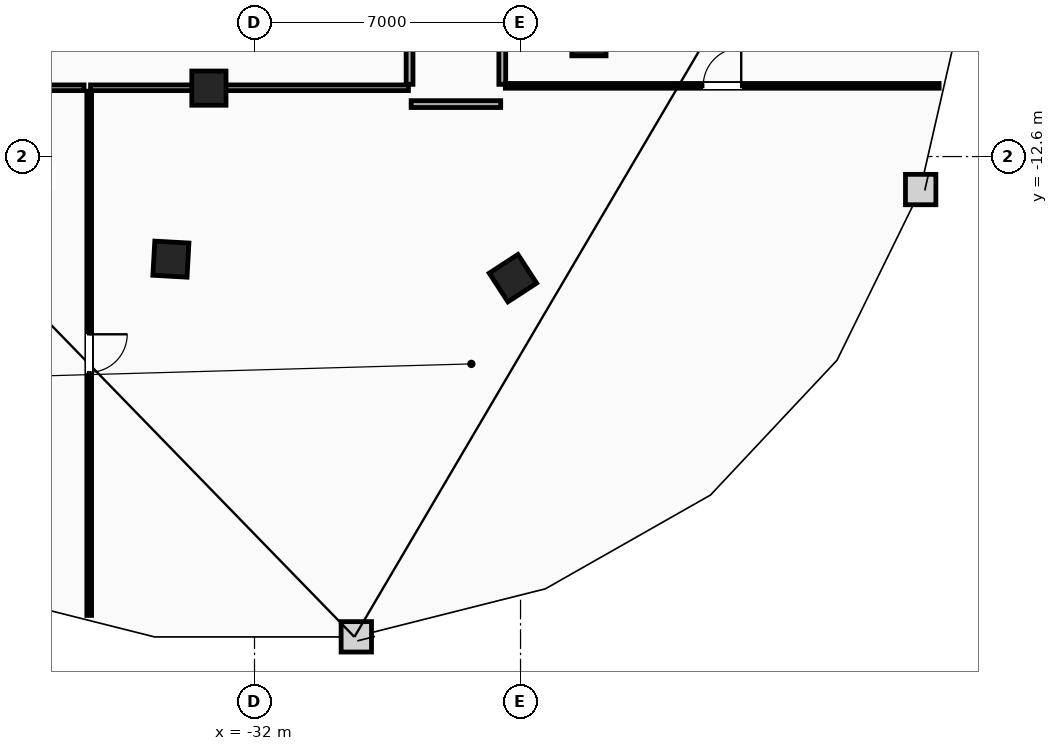
"""IFC4 building model, lengths in metres.
Left out: names, types, materials, properties, quantities, classifications, styles, units other than length and angle.
Written with IfcOpenShell. Run it as: python <this file> out.ifc"""

import sys

from ifc_helpers import new_model, si_unit, direction, frame, frame_2d, origin, origin_2d, place, context, subcontext, project, spatial, rectangle, extrude, element, fill, save


model = new_model("IFC4")
c1 = context("Model", 3, precision=1e-05, world=origin(), true_north=direction((0.0, 1.0)))
c2 = subcontext(c1, "Body", "Model", "MODEL_VIEW")
j1 = project(units=[si_unit("LENGTHUNIT", "METRE"), si_unit("PLANEANGLEUNIT", "RADIAN")], contexts=[c1])
p1 = place(None, origin())
s1 = spatial("IfcSite", under=j1, at=p1, CompositionType="ELEMENT")
p2 = place(p1, origin())
s2 = spatial("IfcBuilding", under=s1, at=p2, CompositionType="ELEMENT")
p3 = place(p2, frame((0.0, 0.0, 217.0)))
s3 = spatial("IfcBuildingStorey", under=s2, at=p3, CompositionType="ELEMENT", Elevation=217.0)
for number, where, z_axis, x_axis in (
    (1, (-33.2, -10.8, 0.0), (0.0, 0.0, 1.0), (1.0, 0.0, 0.0)),
    (2, (-23.2, -9.5, 0.0), (0.0, 0.0, 1.0), (1.0, 0.0, 0.0)),
    (3, (-34.2, -15.3, 0.0), (0.0, 0.0, 1.0), (0.998, -0.055, 0.0)),
    (4, (-25.2, -15.8, 0.0), (0.0, 0.0, 1.0), (0.838, 0.546, 0.0)),
):
    element("IfcColumn", number, at=place(p3, frame(where, z_axis=z_axis, x_axis=x_axis)), inside=s3, PredefinedType="COLUMN", context=c2, shape_type="SweptSolid", body=[
        extrude(rectangle(XDim=0.9, YDim=0.9, at=origin_2d()), origin(), (0.0, 0.0, 1.0), 3.6),
    ])
p4 = place(p3, frame((-50.082, -10.79, 0.0), z_axis=(0.0, 0.0, 1.0), x_axis=(1.0, 0.0, 0.0)))
e5 = element("IfcWall", 5, at=p4, inside=s3, PredefinedType="PARTITIONING", context=c2, shape_type="SweptSolid", body=[
    extrude(rectangle(XDim=13.597, YDim=0.15, at=frame_2d((6.799, 0.0))), origin(), (0.0, 0.0, 1.0), 3.34),
])
p5 = place(p3, frame((-36.315, -10.79, 0.0), z_axis=(0.0, 0.0, 1.0), x_axis=(1.0, 0.0, 0.0)))
e6 = element("IfcWall", 6, at=p5, inside=s3, PredefinedType="PARTITIONING", context=c2, shape_type="SweptSolid", body=[
    extrude(rectangle(XDim=8.365, YDim=0.15, at=frame_2d((4.183, 0.0))), origin(), (0.0, 0.0, 1.0), 2.724),
])
p6 = place(p3, frame((-27.878, -11.22, 0.0), z_axis=(0.0, 0.0, 1.0), x_axis=(1.0, 0.0, 0.0)))
e7 = element("IfcWall", 7, at=p6, inside=s3, PredefinedType="PARTITIONING", context=c2, shape_type="SweptSolid", body=[
    extrude(rectangle(XDim=2.357, YDim=0.18, at=frame_2d((1.178, 0.0))), origin(), (0.0, 0.0, 1.0), 3.34),
])
p7 = place(p3, frame((-27.92, -0.45, 0.0), z_axis=(0.0, 0.0, 1.0), x_axis=(0.0, -1.0, 0.0)))
e8 = element("IfcWall", 8, at=p7, inside=s3, PredefinedType="PARTITIONING", context=c2, shape_type="SweptSolid", body=[
    extrude(rectangle(XDim=10.25, YDim=0.18, at=frame_2d((5.125, 0.0))), origin(), (0.0, 0.0, 1.0), 3.34),
])
p8 = place(p7, frame((4.625, 0.0, 0.0)))
e9 = element("IfcOpeningElement", 9, at=p8, cuts=e8, PredefinedType="OPENING", context=c2, shape_type="SweptSolid", body=[
    extrude(rectangle(XDim=1.0, YDim=2.15, at=frame_2d((0.5, 1.075))), frame((0.0, 0.1, 0.0), z_axis=(0.0, -1.0, 0.0), x_axis=(1.0, 0.0, 0.0)), (0.0, 0.0, 1.0), 0.2),
])
p9 = place(p3, frame((-25.48, -10.7, 0.0), z_axis=(0.0, 0.0, 1.0), x_axis=(0.0, 1.0, 0.0)))
e10 = element("IfcWall", 10, at=p9, inside=s3, PredefinedType="PARTITIONING", context=c2, shape_type="SweptSolid", body=[
    extrude(rectangle(XDim=10.25, YDim=0.18, at=frame_2d((5.125, 0.0))), origin(), (0.0, 0.0, 1.0), 3.34),
])
p10 = place(p3, frame((-25.4, -10.74, 0.0), z_axis=(0.0, 0.0, 1.0), x_axis=(1.0, 0.0, 0.0)))
e11 = element("IfcWall", 11, at=p10, inside=s3, PredefinedType="PARTITIONING", context=c2, shape_type="SweptSolid", body=[
    extrude(rectangle(XDim=11.415, YDim=0.125, at=frame_2d((5.708, 0.0))), origin(), (0.0, 0.0, 1.0), 3.34),
])
p11 = place(p10, frame((5.208, 0.0, 0.0)))
e12 = element("IfcOpeningElement", 12, at=p11, cuts=e11, PredefinedType="OPENING", context=c2, shape_type="SweptSolid", body=[
    extrude(rectangle(XDim=1.0, YDim=2.15, at=frame_2d((0.5, 1.075))), frame((0.0, 0.073, 0.0), z_axis=(0.0, -1.0, 0.0), x_axis=(1.0, 0.0, 0.0)), (0.0, 0.0, 1.0), 0.145),
])
p12 = place(p3, frame((-36.35, -10.88, 0.0), z_axis=(0.0, 0.0, 1.0), x_axis=(0.0, -1.0, 0.0)))
e13 = element("IfcWall", 13, at=p12, inside=s3, PredefinedType="PARTITIONING", context=c2, shape_type="SweptSolid", body=[
    extrude(rectangle(XDim=13.794, YDim=0.125, at=frame_2d((6.897, 0.0))), origin(), (0.0, 0.0, 1.0), 3.34),
])
p13 = place(p12, frame((6.397, 0.0, 0.0)))
e14 = element("IfcOpeningElement", 14, at=p13, cuts=e13, PredefinedType="OPENING", context=c2, shape_type="SweptSolid", body=[
    extrude(rectangle(XDim=1.0, YDim=2.15, at=frame_2d((0.5, 1.075))), frame((0.0, 0.073, 0.0), z_axis=(0.0, -1.0, 0.0), x_axis=(1.0, 0.0, 0.0)), (0.0, 0.0, 1.0), 0.145),
])
p14 = place(p13, origin())
e15 = element("IfcDoor", 15, at=p14, inside=s3, OperationType="SINGLE_SWING_LEFT", PredefinedType="DOOR", context=c2, shape_type="SweptSolid", body=[
    extrude(rectangle(XDim=1.0, YDim=2.15, at=frame_2d((0.5, 1.075))), frame((0.0, 0.025, 0.0), z_axis=(0.0, -1.0, 0.0), x_axis=(1.0, 0.0, 0.0)), (0.0, 0.0, 1.0), 0.05),
])
fill(e14, e15)
p15 = place(p11, origin())
e16 = element("IfcDoor", 16, at=p15, inside=s3, OperationType="SINGLE_SWING_RIGHT", PredefinedType="DOOR", context=c2, shape_type="SweptSolid", body=[
    extrude(rectangle(XDim=1.0, YDim=2.15, at=frame_2d((0.5, 1.075))), frame((0.0, 0.025, 0.0), z_axis=(0.0, -1.0, 0.0), x_axis=(1.0, 0.0, 0.0)), (0.0, 0.0, 1.0), 0.05),
])
fill(e12, e16)
save(model, sys.argv[1])
